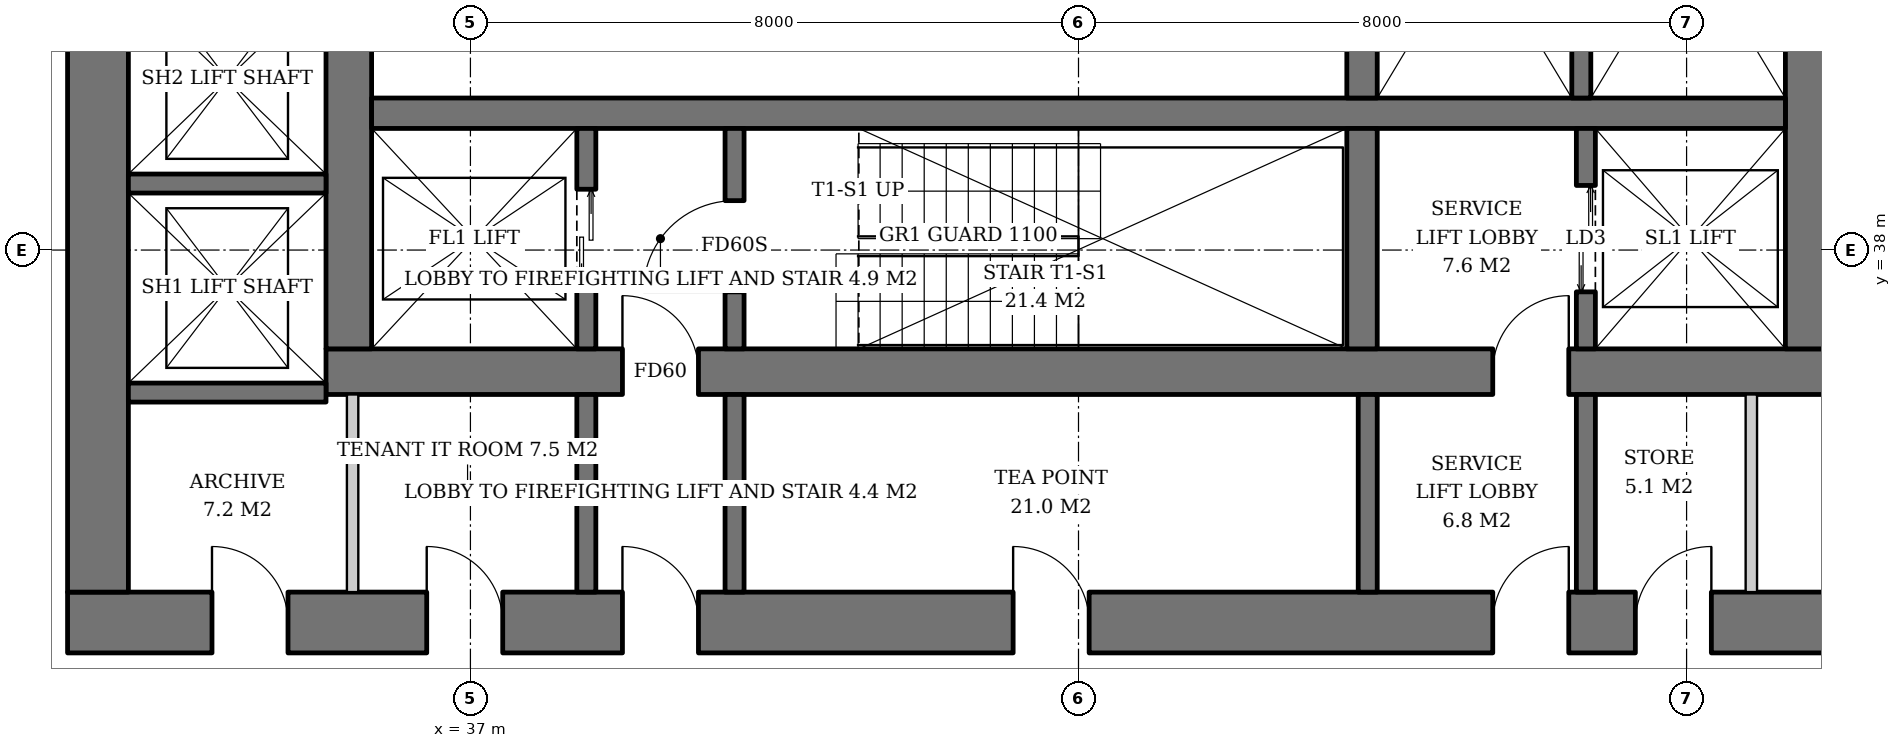
"""IFC4 building model, lengths in metres.
Left out: names, types, materials, properties, quantities, classifications, styles, units other than length and angle.
Written with IfcOpenShell. Run it as: python <this file> out.ifc"""

import sys

from ifc_helpers import new_model, si_unit, direction, frame, frame_2d, origin, place, context, subcontext, project, spatial, rectangle, extrude, element, fill, save


model = new_model("IFC4")
c1 = context("Model", 3, precision=1e-05, world=origin(), true_north=direction((0.0, 1.0)))
c2 = subcontext(c1, "Body", "Model", "MODEL_VIEW")
j1 = project(units=[si_unit("LENGTHUNIT", "METRE"), si_unit("PLANEANGLEUNIT", "RADIAN")], contexts=[c1])
p1 = place(None, origin())
s1 = spatial("IfcSite", under=j1, at=p1, CompositionType="ELEMENT")
p2 = place(p1, origin())
s2 = spatial("IfcBuilding", under=s1, at=p2, CompositionType="ELEMENT")
p3 = place(p2, frame((0.0, 0.0, 24.8)))
s3 = spatial("IfcBuildingStorey", under=s2, at=p3, CompositionType="ELEMENT", Elevation=24.8)
p4 = place(p3, frame((35.1, 36.4, 0.0), z_axis=(0.0, 0.0, 1.0), x_axis=(1.0, 0.0, 0.0)))
e1 = element("IfcWall", 1, at=p4, inside=s3, PredefinedType="SHEAR", context=c2, shape_type="SweptSolid", body=[
    extrude(rectangle(XDim=19.8, YDim=0.6, at=frame_2d((9.9, 0.0))), origin(), (0.0, 0.0, 1.0), 3.8),
])
p5 = place(p4, frame((3.9, 0.0, 0.0)))
e2 = element("IfcOpeningElement", 2, at=p5, cuts=e1, PredefinedType="OPENING", context=c2, shape_type="SweptSolid", body=[
    extrude(rectangle(XDim=1.0, YDim=2.1, at=frame_2d((0.5, 1.05))), frame((0.0, 0.31, 0.0), z_axis=(0.0, -1.0, 0.0), x_axis=(1.0, 0.0, 0.0)), (0.0, 0.0, 1.0), 0.62),
])
p6 = place(p4, frame((15.35, 0.0, 0.0)))
e3 = element("IfcOpeningElement", 3, at=p6, cuts=e1, PredefinedType="OPENING", context=c2, shape_type="SweptSolid", body=[
    extrude(rectangle(XDim=1.0, YDim=2.1, at=frame_2d((0.5, 1.05))), frame((0.0, 0.31, 0.0), z_axis=(0.0, -1.0, 0.0), x_axis=(1.0, 0.0, 0.0)), (0.0, 0.0, 1.0), 0.62),
])
p7 = place(p3, frame((35.4, 36.7, 0.0), z_axis=(0.0, 0.0, 1.0), x_axis=(0.0, 1.0, 0.0)))
e4 = element("IfcWall", 4, at=p7, inside=s3, PredefinedType="SHEAR", context=c2, shape_type="SweptSolid", body=[
    extrude(rectangle(XDim=18.6, YDim=0.6, at=frame_2d((9.3, 0.0))), origin(), (0.0, 0.0, 1.0), 3.8),
])
p8 = place(p7, frame((8.4, 0.0, 0.0)))
e5 = element("IfcOpeningElement", 5, at=p8, cuts=e4, PredefinedType="OPENING", context=c2, shape_type="SweptSolid", body=[
    extrude(rectangle(XDim=1.8, YDim=2.4, at=frame_2d((0.9, 1.2))), frame((0.0, 0.31, 0.0), z_axis=(0.0, -1.0, 0.0), x_axis=(1.0, 0.0, 0.0)), (0.0, 0.0, 1.0), 0.62),
])
p9 = place(p3, frame((54.6, 36.7, 0.0), z_axis=(0.0, 0.0, 1.0), x_axis=(0.0, 1.0, 0.0)))
e6 = element("IfcWall", 6, at=p9, inside=s3, PredefinedType="SHEAR", context=c2, shape_type="SweptSolid", body=[
    extrude(rectangle(XDim=18.6, YDim=0.6, at=frame_2d((9.3, 0.0))), origin(), (0.0, 0.0, 1.0), 3.8),
])
p10 = place(p9, frame((8.4, 0.0, 0.0)))
e7 = element("IfcOpeningElement", 7, at=p10, cuts=e6, PredefinedType="OPENING", context=c2, shape_type="SweptSolid", body=[
    extrude(rectangle(XDim=1.8, YDim=2.4, at=frame_2d((0.9, 1.2))), frame((0.0, 0.31, 0.0), z_axis=(0.0, -1.0, 0.0), x_axis=(1.0, 0.0, 0.0)), (0.0, 0.0, 1.0), 0.62),
])
p11 = place(p3, frame((31.7, 33.1, 0.0), z_axis=(0.0, 0.0, 1.0), x_axis=(1.0, 0.0, 0.0)))
e8 = element("IfcWall", 8, at=p11, inside=s3, PredefinedType="SHEAR", context=c2, shape_type="SweptSolid", body=[
    extrude(rectangle(XDim=26.6, YDim=0.8, at=frame_2d((13.3, 0.0))), origin(), (0.0, 0.0, 1.0), 3.8),
])
p12 = place(p11, frame((7.3, 0.0, 0.0)))
e9 = element("IfcOpeningElement", 9, at=p12, cuts=e8, PredefinedType="OPENING", context=c2, shape_type="SweptSolid", body=[
    extrude(rectangle(XDim=1.0, YDim=2.1, at=frame_2d((0.5, 1.05))), frame((0.0, 0.41, 0.0), z_axis=(0.0, -1.0, 0.0), x_axis=(1.0, 0.0, 0.0)), (0.0, 0.0, 1.0), 0.82),
])
p13 = place(p11, frame((18.75, 0.0, 0.0)))
e10 = element("IfcOpeningElement", 10, at=p13, cuts=e8, PredefinedType="OPENING", context=c2, shape_type="SweptSolid", body=[
    extrude(rectangle(XDim=1.0, YDim=2.1, at=frame_2d((0.5, 1.05))), frame((0.0, 0.41, 0.0), z_axis=(0.0, -1.0, 0.0), x_axis=(1.0, 0.0, 0.0)), (0.0, 0.0, 1.0), 0.82),
])
p14 = place(p11, frame((1.9, 0.0, 0.0)))
e11 = element("IfcOpeningElement", 11, at=p14, cuts=e8, PredefinedType="OPENING", context=c2, shape_type="SweptSolid", body=[
    extrude(rectangle(XDim=1.0, YDim=2.1, at=frame_2d((0.5, 1.05))), frame((0.0, 0.41, 0.0), z_axis=(0.0, -1.0, 0.0), x_axis=(1.0, 0.0, 0.0)), (0.0, 0.0, 1.0), 0.82),
])
p15 = place(p11, frame((4.725, 0.0, 0.0)))
e12 = element("IfcOpeningElement", 12, at=p15, cuts=e8, PredefinedType="OPENING", context=c2, shape_type="SweptSolid", body=[
    extrude(rectangle(XDim=1.0, YDim=2.1, at=frame_2d((0.5, 1.05))), frame((0.0, 0.41, 0.0), z_axis=(0.0, -1.0, 0.0), x_axis=(1.0, 0.0, 0.0)), (0.0, 0.0, 1.0), 0.82),
])
p16 = place(p11, frame((12.44, 0.0, 0.0)))
e13 = element("IfcOpeningElement", 13, at=p16, cuts=e8, PredefinedType="OPENING", context=c2, shape_type="SweptSolid", body=[
    extrude(rectangle(XDim=1.0, YDim=2.1, at=frame_2d((0.5, 1.05))), frame((0.0, 0.41, 0.0), z_axis=(0.0, -1.0, 0.0), x_axis=(1.0, 0.0, 0.0)), (0.0, 0.0, 1.0), 0.82),
])
p17 = place(p11, frame((20.626, 0.0, 0.0)))
e14 = element("IfcOpeningElement", 14, at=p17, cuts=e8, PredefinedType="OPENING", context=c2, shape_type="SweptSolid", body=[
    extrude(rectangle(XDim=1.0, YDim=2.1, at=frame_2d((0.5, 1.05))), frame((0.0, 0.41, 0.0), z_axis=(0.0, -1.0, 0.0), x_axis=(1.0, 0.0, 0.0)), (0.0, 0.0, 1.0), 0.82),
])
p18 = place(p11, frame((23.476, 0.0, 0.0)))
e15 = element("IfcOpeningElement", 15, at=p18, cuts=e8, PredefinedType="OPENING", context=c2, shape_type="SweptSolid", body=[
    extrude(rectangle(XDim=1.0, YDim=2.1, at=frame_2d((0.5, 1.05))), frame((0.0, 0.41, 0.0), z_axis=(0.0, -1.0, 0.0), x_axis=(1.0, 0.0, 0.0)), (0.0, 0.0, 1.0), 0.82),
])
p19 = place(p3, frame((32.1, 33.5, 0.0), z_axis=(0.0, 0.0, 1.0), x_axis=(0.0, 1.0, 0.0)))
e16 = element("IfcWall", 16, at=p19, inside=s3, PredefinedType="SHEAR", context=c2, shape_type="SweptSolid", body=[
    extrude(rectangle(XDim=25.0, YDim=0.8, at=frame_2d((12.5, 0.0))), origin(), (0.0, 0.0, 1.0), 3.8),
])
p20 = place(p19, frame((11.6, 0.0, 0.0)))
e17 = element("IfcOpeningElement", 17, at=p20, cuts=e16, PredefinedType="OPENING", context=c2, shape_type="SweptSolid", body=[
    extrude(rectangle(XDim=1.8, YDim=2.4, at=frame_2d((0.9, 1.2))), frame((0.0, 0.41, 0.0), z_axis=(0.0, -1.0, 0.0), x_axis=(1.0, 0.0, 0.0)), (0.0, 0.0, 1.0), 0.82),
])
p21 = place(p3, frame((35.7, 39.8, 0.0), z_axis=(0.0, 0.0, 1.0), x_axis=(1.0, 0.0, 0.0)))
e18 = element("IfcWall", 18, at=p21, inside=s3, PredefinedType="SHEAR", context=c2, shape_type="SweptSolid", body=[
    extrude(rectangle(XDim=18.6, YDim=0.4, at=frame_2d((9.3, 0.0))), origin(), (0.0, 0.0, 1.0), 3.8),
])
p22 = place(p3, frame((48.73, 36.7, 0.0), z_axis=(0.0, 0.0, 1.0), x_axis=(0.0, 1.0, 0.0)))
e19 = element("IfcWall", 19, at=p22, inside=s3, PredefinedType="SHEAR", context=c2, shape_type="SweptSolid", body=[
    extrude(rectangle(XDim=2.9, YDim=0.4, at=frame_2d((1.45, 0.0))), origin(), (0.0, 0.0, 1.0), 3.8),
])
p23 = place(p3, frame((48.73, 40.0, 0.0), z_axis=(0.0, 0.0, 1.0), x_axis=(0.0, 1.0, 0.0)))
e20 = element("IfcWall", 20, at=p23, inside=s3, PredefinedType="SHEAR", context=c2, shape_type="SweptSolid", body=[
    extrude(rectangle(XDim=12.0, YDim=0.4, at=frame_2d((6.0, 0.0))), origin(), (0.0, 0.0, 1.0), 3.8),
])
p24 = place(p3, frame((38.525, 36.7, 0.0), z_axis=(0.0, 0.0, 1.0), x_axis=(0.0, 1.0, 0.0)))
e21 = element("IfcWall", 21, at=p24, inside=s3, PredefinedType="SHEAR", context=c2, shape_type="SweptSolid", body=[
    extrude(rectangle(XDim=2.9, YDim=0.25, at=frame_2d((1.45, 0.0))), origin(), (0.0, 0.0, 1.0), 3.8),
])
p25 = place(p24, frame((0.8, 0.0, 0.0)))
e22 = element("IfcOpeningElement", 22, at=p25, cuts=e21, PredefinedType="OPENING", context=c2, shape_type="SweptSolid", body=[
    extrude(rectangle(XDim=1.3, YDim=2.2, at=frame_2d((0.65, 1.1))), frame((0.0, 0.135, 0.0), z_axis=(0.0, -1.0, 0.0), x_axis=(1.0, 0.0, 0.0)), (0.0, 0.0, 1.0), 0.27),
])
p26 = place(p3, frame((40.475, 36.7, 0.0), z_axis=(0.0, 0.0, 1.0), x_axis=(0.0, 1.0, 0.0)))
e23 = element("IfcWall", 23, at=p26, inside=s3, PredefinedType="SHEAR", context=c2, shape_type="SweptSolid", body=[
    extrude(rectangle(XDim=2.9, YDim=0.25, at=frame_2d((1.45, 0.0))), origin(), (0.0, 0.0, 1.0), 3.8),
])
p27 = place(p26, frame((0.75, 0.0, 0.0)))
e24 = element("IfcOpeningElement", 24, at=p27, cuts=e23, PredefinedType="OPENING", context=c2, shape_type="SweptSolid", body=[
    extrude(rectangle(XDim=1.2, YDim=2.1, at=frame_2d((0.6, 1.05))), frame((0.0, 0.135, 0.0), z_axis=(0.0, -1.0, 0.0), x_axis=(1.0, 0.0, 0.0)), (0.0, 0.0, 1.0), 0.27),
])
p28 = place(p3, frame((51.675, 36.7, 0.0), z_axis=(0.0, 0.0, 1.0), x_axis=(0.0, 1.0, 0.0)))
e25 = element("IfcWall", 25, at=p28, inside=s3, PredefinedType="SHEAR", context=c2, shape_type="SweptSolid", body=[
    extrude(rectangle(XDim=2.9, YDim=0.25, at=frame_2d((1.45, 0.0))), origin(), (0.0, 0.0, 1.0), 3.8),
])
p29 = place(p28, frame((0.75, 0.0, 0.0)))
e26 = element("IfcOpeningElement", 26, at=p29, cuts=e25, PredefinedType="OPENING", context=c2, shape_type="SweptSolid", body=[
    extrude(rectangle(XDim=1.4, YDim=2.4, at=frame_2d((0.7, 1.2))), frame((0.0, 0.135, 0.0), z_axis=(0.0, -1.0, 0.0), x_axis=(1.0, 0.0, 0.0)), (0.0, 0.0, 1.0), 0.27),
])
p30 = place(p3, frame((51.615, 44.25, 0.0), z_axis=(0.0, 0.0, 1.0), x_axis=(0.0, -1.0, 0.0)))
e27 = element("IfcWall", 27, at=p30, inside=s3, PredefinedType="SHEAR", context=c2, shape_type="SweptSolid", body=[
    extrude(rectangle(XDim=4.25, YDim=0.25, at=frame_2d((2.125, 0.0))), origin(), (0.0, 0.0, 1.0), 3.8),
])
for number, where, z_axis, x_axis in (
    (28, (32.5, 36.125, 0.0), (0.0, 0.0, 1.0), (1.0, 0.0, 0.0)),
    (29, (32.5, 38.875, 0.0), (0.0, 0.0, 1.0), (1.0, 0.0, 0.0)),
):
    element("IfcWall", number, at=place(p3, frame(where, z_axis=z_axis, x_axis=x_axis)), inside=s3, PredefinedType="SHEAR", context=c2, shape_type="SweptSolid", body=[
        extrude(rectangle(XDim=2.6, YDim=0.25, at=frame_2d((1.3, 0.0))), origin(), (0.0, 0.0, 1.0), 3.8),
    ])
for number, where, z_axis, x_axis in (
    (30, (38.525, 33.5, 0.0), (0.0, 0.0, 1.0), (0.0, 1.0, 0.0)),
    (31, (40.475, 33.5, 0.0), (0.0, 0.0, 1.0), (0.0, 1.0, 0.0)),
    (32, (48.805, 33.5, 0.0), (0.0, 0.0, 1.0), (0.0, 1.0, 0.0)),
    (33, (51.675, 33.5, 0.0), (0.0, 0.0, 1.0), (0.0, 1.0, 0.0)),
):
    element("IfcWall", number, at=place(p3, frame(where, z_axis=z_axis, x_axis=x_axis)), inside=s3, PredefinedType="SOLIDWALL", context=c2, shape_type="SweptSolid", body=[
        extrude(rectangle(XDim=2.6, YDim=0.25, at=frame_2d((1.3, 0.0))), origin(), (0.0, 0.0, 1.0), 3.62),
    ])
for number, where, z_axis, x_axis in (
    (34, (35.45, 33.5, 0.0), (0.0, 0.0, 1.0), (0.0, 1.0, 0.0)),
    (35, (53.852, 33.5, 0.0), (0.0, 0.0, 1.0), (0.0, 1.0, 0.0)),
):
    element("IfcWall", number, at=place(p3, frame(where, z_axis=z_axis, x_axis=x_axis)), inside=s3, PredefinedType="SOLIDWALL", context=c2, shape_type="SweptSolid", body=[
        extrude(rectangle(XDim=2.6, YDim=0.15, at=frame_2d((1.3, 0.0))), origin(), (0.0, 0.0, 1.0), 3.62),
    ])
p31 = place(p25, origin())
e36 = element("IfcDoor", 36, at=p31, inside=s3, OperationType="DOUBLE_DOOR_SLIDING", PredefinedType="DOOR", context=c2, shape_type="SweptSolid", body=[
    extrude(rectangle(XDim=1.3, YDim=2.2, at=frame_2d((0.65, 1.1))), frame((0.0, 0.025, 0.0), z_axis=(0.0, -1.0, 0.0), x_axis=(1.0, 0.0, 0.0)), (0.0, 0.0, 1.0), 0.05),
])
fill(e22, e36)
p32 = place(p27, origin())
e37 = element("IfcDoor", 37, at=p32, inside=s3, OperationType="SINGLE_SWING_LEFT", PredefinedType="DOOR", context=c2, shape_type="SweptSolid", body=[
    extrude(rectangle(XDim=1.2, YDim=2.1, at=frame_2d((0.6, 1.05))), frame((0.0, 0.025, 0.0), z_axis=(0.0, -1.0, 0.0), x_axis=(1.0, 0.0, 0.0)), (0.0, 0.0, 1.0), 0.05),
])
fill(e24, e37)
p33 = place(p29, origin())
e38 = element("IfcDoor", 38, at=p33, inside=s3, OperationType="DOUBLE_DOOR_SLIDING", PredefinedType="DOOR", context=c2, shape_type="SweptSolid", body=[
    extrude(rectangle(XDim=1.4, YDim=2.4, at=frame_2d((0.7, 1.2))), frame((0.0, 0.025, 0.0), z_axis=(0.0, -1.0, 0.0), x_axis=(1.0, 0.0, 0.0)), (0.0, 0.0, 1.0), 0.05),
])
fill(e26, e38)
p34 = place(p5, origin())
e39 = element("IfcDoor", 39, at=p34, inside=s3, OperationType="SINGLE_SWING_LEFT", PredefinedType="DOOR", context=c2, shape_type="SweptSolid", body=[
    extrude(rectangle(XDim=1.0, YDim=2.1, at=frame_2d((0.5, 1.05))), frame((0.0, 0.025, 0.0), z_axis=(0.0, -1.0, 0.0), x_axis=(1.0, 0.0, 0.0)), (0.0, 0.0, 1.0), 0.05),
])
fill(e2, e39)
p35 = place(p6, origin())
e40 = element("IfcDoor", 40, at=p35, inside=s3, OperationType="SINGLE_SWING_RIGHT", PredefinedType="DOOR", context=c2, shape_type="SweptSolid", body=[
    extrude(rectangle(XDim=1.0, YDim=2.1, at=frame_2d((0.5, 1.05))), frame((0.0, 0.025, 0.0), z_axis=(0.0, -1.0, 0.0), x_axis=(1.0, 0.0, 0.0)), (0.0, 0.0, 1.0), 0.05),
])
fill(e3, e40)
p36 = place(p12, origin())
e41 = element("IfcDoor", 41, at=p36, inside=s3, OperationType="SINGLE_SWING_LEFT", PredefinedType="DOOR", context=c2, shape_type="SweptSolid", body=[
    extrude(rectangle(XDim=1.0, YDim=2.1, at=frame_2d((0.5, 1.05))), frame((0.0, 0.025, 0.0), z_axis=(0.0, -1.0, 0.0), x_axis=(1.0, 0.0, 0.0)), (0.0, 0.0, 1.0), 0.05),
])
fill(e9, e41)
p37 = place(p13, origin())
e42 = element("IfcDoor", 42, at=p37, inside=s3, OperationType="SINGLE_SWING_RIGHT", PredefinedType="DOOR", context=c2, shape_type="SweptSolid", body=[
    extrude(rectangle(XDim=1.0, YDim=2.1, at=frame_2d((0.5, 1.05))), frame((0.0, 0.025, 0.0), z_axis=(0.0, -1.0, 0.0), x_axis=(1.0, 0.0, 0.0)), (0.0, 0.0, 1.0), 0.05),
])
fill(e10, e42)
p38 = place(p14, origin())
e43 = element("IfcDoor", 43, at=p38, inside=s3, OperationType="SINGLE_SWING_LEFT", PredefinedType="DOOR", context=c2, shape_type="SweptSolid", body=[
    extrude(rectangle(XDim=1.0, YDim=2.1, at=frame_2d((0.5, 1.05))), frame((0.0, 0.39, 0.0), z_axis=(0.0, -1.0, 0.0), x_axis=(1.0, 0.0, 0.0)), (0.0, 0.0, 1.0), 0.05),
])
fill(e11, e43)
p39 = place(p15, origin())
e44 = element("IfcDoor", 44, at=p39, inside=s3, OperationType="SINGLE_SWING_LEFT", PredefinedType="DOOR", context=c2, shape_type="SweptSolid", body=[
    extrude(rectangle(XDim=1.0, YDim=2.1, at=frame_2d((0.5, 1.05))), frame((0.0, 0.39, 0.0), z_axis=(0.0, -1.0, 0.0), x_axis=(1.0, 0.0, 0.0)), (0.0, 0.0, 1.0), 0.05),
])
fill(e12, e44)
p40 = place(p16, origin())
e45 = element("IfcDoor", 45, at=p40, inside=s3, OperationType="SINGLE_SWING_LEFT", PredefinedType="DOOR", context=c2, shape_type="SweptSolid", body=[
    extrude(rectangle(XDim=1.0, YDim=2.1, at=frame_2d((0.5, 1.05))), frame((0.0, 0.39, 0.0), z_axis=(0.0, -1.0, 0.0), x_axis=(1.0, 0.0, 0.0)), (0.0, 0.0, 1.0), 0.05),
])
fill(e13, e45)
p41 = place(p17, origin())
e46 = element("IfcDoor", 46, at=p41, inside=s3, OperationType="SINGLE_SWING_RIGHT", PredefinedType="DOOR", context=c2, shape_type="SweptSolid", body=[
    extrude(rectangle(XDim=1.0, YDim=2.1, at=frame_2d((0.5, 1.05))), frame((0.0, 0.39, 0.0), z_axis=(0.0, -1.0, 0.0), x_axis=(1.0, 0.0, 0.0)), (0.0, 0.0, 1.0), 0.05),
])
fill(e14, e46)
save(model, sys.argv[1])
